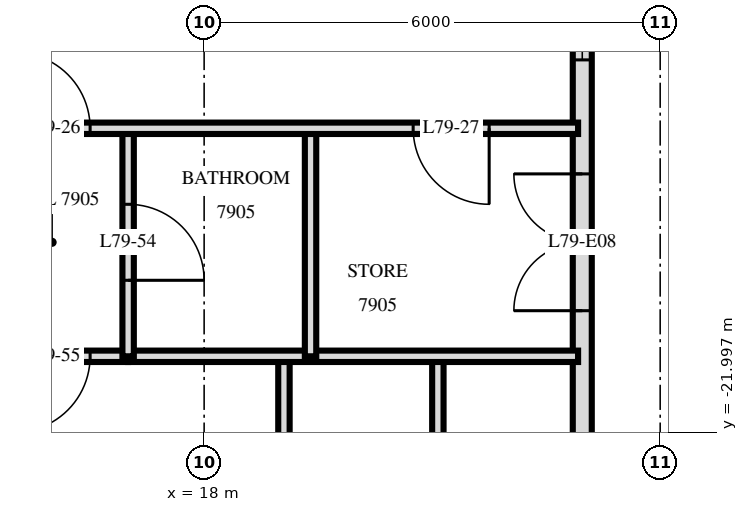
"""IFC4 building model, lengths in metres.
Left out: names, types, materials, properties, quantities, classifications, styles, units other than length and angle.
Written with IfcOpenShell. Run it as: python <this file> out.ifc"""

import sys

from ifc_helpers import new_model, si_unit, direction, frame, frame_2d, origin, place, context, subcontext, project, spatial, rectangle, extrude, element, fill, save


model = new_model("IFC4")
c1 = context("Model", 3, precision=1e-05, world=origin(), true_north=direction((0.0, 1.0)))
c2 = subcontext(c1, "Body", "Model", "MODEL_VIEW")
j1 = project(units=[si_unit("LENGTHUNIT", "METRE"), si_unit("PLANEANGLEUNIT", "RADIAN")], contexts=[c1])
p1 = place(None, origin())
s1 = spatial("IfcSite", under=j1, at=p1, CompositionType="ELEMENT")
p2 = place(p1, origin())
s2 = spatial("IfcBuilding", under=s1, at=p2, CompositionType="ELEMENT")
p3 = place(p2, frame((0.0, 0.0, 298.1)))
s3 = spatial("IfcBuildingStorey", under=s2, at=p3, CompositionType="ELEMENT", Elevation=298.1)
p4 = place(p3, frame((22.975, -29.275, 0.0), z_axis=(0.0, 0.0, 1.0), x_axis=(0.0, 1.0, 0.0)))
e1 = element("IfcWall", 1, at=p4, inside=s3, PredefinedType="SOLIDWALL", context=c2, shape_type="SweptSolid", body=[
    extrude(rectangle(XDim=25.951, YDim=0.25, at=frame_2d((12.975, 0.0))), origin(), (0.0, 0.0, 1.0), 3.22),
])
p5 = place(p4, frame((0.575, 0.0, 0.0)))
e2 = element("IfcOpeningElement", 2, at=p5, cuts=e1, PredefinedType="OPENING", context=c2, shape_type="SweptSolid", body=[
    extrude(rectangle(XDim=1.8, YDim=2.4, at=frame_2d((0.9, 1.2))), frame((0.0, 0.135, 0.0), z_axis=(0.0, -1.0, 0.0), x_axis=(1.0, 0.0, 0.0)), (0.0, 0.0, 1.0), 0.27),
])
p6 = place(p4, frame((3.325, 0.0, 0.9)))
e3 = element("IfcOpeningElement", 3, at=p6, cuts=e1, PredefinedType="OPENING", context=c2, shape_type="SweptSolid", body=[
    extrude(rectangle(XDim=1.8, YDim=1.5, at=frame_2d((0.9, 0.75))), frame((0.0, 0.135, 0.0), z_axis=(0.0, -1.0, 0.0), x_axis=(1.0, 0.0, 0.0)), (0.0, 0.0, 1.0), 0.27),
])
p7 = place(p4, frame((8.875, 0.0, 0.0)))
e4 = element("IfcOpeningElement", 4, at=p7, cuts=e1, PredefinedType="OPENING", context=c2, shape_type="SweptSolid", body=[
    extrude(rectangle(XDim=1.8, YDim=2.4, at=frame_2d((0.9, 1.2))), frame((0.0, 0.135, 0.0), z_axis=(0.0, -1.0, 0.0), x_axis=(1.0, 0.0, 0.0)), (0.0, 0.0, 1.0), 0.27),
])
p8 = place(p4, frame((12.175, 0.0, 0.9)))
e5 = element("IfcOpeningElement", 5, at=p8, cuts=e1, PredefinedType="OPENING", context=c2, shape_type="SweptSolid", body=[
    extrude(rectangle(XDim=1.2, YDim=1.5, at=frame_2d((0.6, 0.75))), frame((0.0, 0.135, 0.0), z_axis=(0.0, -1.0, 0.0), x_axis=(1.0, 0.0, 0.0)), (0.0, 0.0, 1.0), 0.27),
])
p9 = place(p4, frame((16.175, 0.0, 0.0)))
e6 = element("IfcOpeningElement", 6, at=p9, cuts=e1, PredefinedType="OPENING", context=c2, shape_type="SweptSolid", body=[
    extrude(rectangle(XDim=1.8, YDim=2.4, at=frame_2d((0.9, 1.2))), frame((0.0, 0.135, 0.0), z_axis=(0.0, -1.0, 0.0), x_axis=(1.0, 0.0, 0.0)), (0.0, 0.0, 1.0), 0.27),
])
p10 = place(p4, frame((23.425, 0.0, 0.0)))
e7 = element("IfcOpeningElement", 7, at=p10, cuts=e1, PredefinedType="OPENING", context=c2, shape_type="SweptSolid", body=[
    extrude(rectangle(XDim=1.8, YDim=2.4, at=frame_2d((0.9, 1.2))), frame((0.0, 0.135, 0.0), z_axis=(0.0, -1.0, 0.0), x_axis=(1.0, 0.0, 0.0)), (0.0, 0.0, 1.0), 0.27),
])
p11 = place(p3, frame((21.075, -32.666, 0.0), z_axis=(0.0, 0.0, 1.0), x_axis=(0.0, 1.0, 0.0)))
e8 = element("IfcWall", 8, at=p11, inside=s3, PredefinedType="PARTITIONING", context=c2, shape_type="SweptSolid", body=[
    extrude(rectangle(XDim=11.666, YDim=0.15, at=frame_2d((5.833, 0.0))), origin(), (0.0, 0.0, 1.0), 3.22),
])
p12 = place(p11, frame((5.246, 0.0, 0.0)))
e9 = element("IfcOpeningElement", 9, at=p12, cuts=e8, PredefinedType="OPENING", context=c2, shape_type="SweptSolid", body=[
    extrude(rectangle(XDim=0.9, YDim=2.1, at=frame_2d((0.45, 1.05))), frame((0.0, 0.085, 0.0), z_axis=(0.0, -1.0, 0.0), x_axis=(1.0, 0.0, 0.0)), (0.0, 0.0, 1.0), 0.17),
])
p13 = place(p3, frame((19.4, -21.0, 0.0), z_axis=(0.0, 0.0, 1.0), x_axis=(0.0, 1.0, 0.0)))
e10 = element("IfcWall", 10, at=p13, inside=s3, PredefinedType="PARTITIONING", context=c2, shape_type="SweptSolid", body=[
    extrude(rectangle(XDim=3.0, YDim=0.15, at=frame_2d((1.5, 0.0))), origin(), (0.0, 0.0, 1.0), 3.22),
])
p14 = place(p3, frame((19.05, -33.527, 0.0), z_axis=(0.0, 0.0, 1.0), x_axis=(0.0, 1.0, 0.0)))
e11 = element("IfcWall", 11, at=p14, inside=s3, PredefinedType="PARTITIONING", context=c2, shape_type="SweptSolid", body=[
    extrude(rectangle(XDim=12.527, YDim=0.15, at=frame_2d((6.264, 0.0))), origin(), (0.0, 0.0, 1.0), 3.22),
])
p15 = place(p14, frame((5.707, 0.0, 0.0)))
e12 = element("IfcOpeningElement", 12, at=p15, cuts=e11, PredefinedType="OPENING", context=c2, shape_type="SweptSolid", body=[
    extrude(rectangle(XDim=0.9, YDim=2.1, at=frame_2d((0.45, 1.05))), frame((0.0, 0.085, 0.0), z_axis=(0.0, -1.0, 0.0), x_axis=(1.0, 0.0, 0.0)), (0.0, 0.0, 1.0), 0.17),
])
p16 = place(p3, frame((17.0, -21.0, 0.0), z_axis=(0.0, 0.0, 1.0), x_axis=(0.0, 1.0, 0.0)))
e13 = element("IfcWall", 13, at=p16, inside=s3, PredefinedType="PARTITIONING", context=c2, shape_type="SweptSolid", body=[
    extrude(rectangle(XDim=3.0, YDim=0.15, at=frame_2d((1.5, 0.0))), origin(), (0.0, 0.0, 1.0), 3.22),
])
p17 = place(p16, frame((1.0, 0.0, 0.0)))
e14 = element("IfcOpeningElement", 14, at=p17, cuts=e13, PredefinedType="OPENING", context=c2, shape_type="SweptSolid", body=[
    extrude(rectangle(XDim=1.0, YDim=2.1, at=frame_2d((0.5, 1.05))), frame((0.0, 0.085, 0.0), z_axis=(0.0, -1.0, 0.0), x_axis=(1.0, 0.0, 0.0)), (0.0, 0.0, 1.0), 0.17),
])
p18 = place(p3, frame((15.0, -21.0, 0.0), z_axis=(0.0, 0.0, 1.0), x_axis=(1.0, 0.0, 0.0)))
e15 = element("IfcWall", 15, at=p18, inside=s3, PredefinedType="PARTITIONING", context=c2, shape_type="SweptSolid", body=[
    extrude(rectangle(XDim=2.0, YDim=0.15, at=frame_2d((1.0, 0.0))), origin(), (0.0, 0.0, 1.0), 3.22),
])
p19 = place(p18, frame((0.5, 0.0, 0.0)))
e16 = element("IfcOpeningElement", 16, at=p19, cuts=e15, PredefinedType="OPENING", context=c2, shape_type="SweptSolid", body=[
    extrude(rectangle(XDim=1.0, YDim=2.1, at=frame_2d((0.5, 1.05))), frame((0.0, 0.085, 0.0), z_axis=(0.0, -1.0, 0.0), x_axis=(1.0, 0.0, 0.0)), (0.0, 0.0, 1.0), 0.17),
])
p20 = place(p3, frame((17.0, -21.0, 0.0), z_axis=(0.0, 0.0, 1.0), x_axis=(1.0, 0.0, 0.0)))
e17 = element("IfcWall", 17, at=p20, inside=s3, PredefinedType="PARTITIONING", context=c2, shape_type="SweptSolid", body=[
    extrude(rectangle(XDim=5.92, YDim=0.15, at=frame_2d((2.96, 0.0))), origin(), (0.0, 0.0, 1.0), 3.22),
])
p21 = place(p3, frame((-22.92, -18.0, 0.0), z_axis=(0.0, 0.0, 1.0), x_axis=(1.0, 0.0, 0.0)))
e18 = element("IfcWall", 18, at=p21, inside=s3, PredefinedType="PARTITIONING", context=c2, shape_type="SweptSolid", body=[
    extrude(rectangle(XDim=45.84, YDim=0.15, at=frame_2d((22.92, 0.0))), origin(), (0.0, 0.0, 1.0), 3.22),
])
p22 = place(p21, frame((17.07, 0.0, 0.0)))
e19 = element("IfcOpeningElement", 19, at=p22, cuts=e18, PredefinedType="OPENING", context=c2, shape_type="SweptSolid", body=[
    extrude(rectangle(XDim=1.0, YDim=2.1, at=frame_2d((0.5, 1.05))), frame((0.0, 0.085, 0.0), z_axis=(0.0, -1.0, 0.0), x_axis=(1.0, 0.0, 0.0)), (0.0, 0.0, 1.0), 0.17),
])
p23 = place(p21, frame((21.77, 0.0, 0.0)))
e20 = element("IfcOpeningElement", 20, at=p23, cuts=e18, PredefinedType="OPENING", context=c2, shape_type="SweptSolid", body=[
    extrude(rectangle(XDim=1.0, YDim=2.1, at=frame_2d((0.5, 1.05))), frame((0.0, 0.085, 0.0), z_axis=(0.0, -1.0, 0.0), x_axis=(1.0, 0.0, 0.0)), (0.0, 0.0, 1.0), 0.17),
])
p24 = place(p21, frame((28.72, 0.0, 0.0)))
e21 = element("IfcOpeningElement", 21, at=p24, cuts=e18, PredefinedType="OPENING", context=c2, shape_type="SweptSolid", body=[
    extrude(rectangle(XDim=1.0, YDim=2.1, at=frame_2d((0.5, 1.05))), frame((0.0, 0.085, 0.0), z_axis=(0.0, -1.0, 0.0), x_axis=(1.0, 0.0, 0.0)), (0.0, 0.0, 1.0), 0.17),
])
p25 = place(p21, frame((30.52, 0.0, 0.0)))
e22 = element("IfcOpeningElement", 22, at=p25, cuts=e18, PredefinedType="OPENING", context=c2, shape_type="SweptSolid", body=[
    extrude(rectangle(XDim=1.0, YDim=2.1, at=frame_2d((0.5, 1.05))), frame((0.0, 0.085, 0.0), z_axis=(0.0, -1.0, 0.0), x_axis=(1.0, 0.0, 0.0)), (0.0, 0.0, 1.0), 0.17),
])
p26 = place(p21, frame((9.42, 0.0, 0.0)))
e23 = element("IfcOpeningElement", 23, at=p26, cuts=e18, PredefinedType="OPENING", context=c2, shape_type="SweptSolid", body=[
    extrude(rectangle(XDim=1.0, YDim=2.1, at=frame_2d((0.5, 1.05))), frame((0.0, 0.085, 0.0), z_axis=(0.0, -1.0, 0.0), x_axis=(1.0, 0.0, 0.0)), (0.0, 0.0, 1.0), 0.17),
])
p27 = place(p21, frame((2.67, 0.0, 0.0)))
e24 = element("IfcOpeningElement", 24, at=p27, cuts=e18, PredefinedType="OPENING", context=c2, shape_type="SweptSolid", body=[
    extrude(rectangle(XDim=1.0, YDim=2.1, at=frame_2d((0.5, 1.05))), frame((0.0, 0.085, 0.0), z_axis=(0.0, -1.0, 0.0), x_axis=(1.0, 0.0, 0.0)), (0.0, 0.0, 1.0), 0.17),
])
p28 = place(p21, frame((38.42, 0.0, 0.0)))
e25 = element("IfcOpeningElement", 25, at=p28, cuts=e18, PredefinedType="OPENING", context=c2, shape_type="SweptSolid", body=[
    extrude(rectangle(XDim=1.0, YDim=2.1, at=frame_2d((0.5, 1.05))), frame((0.0, 0.085, 0.0), z_axis=(0.0, -1.0, 0.0), x_axis=(1.0, 0.0, 0.0)), (0.0, 0.0, 1.0), 0.17),
])
p29 = place(p21, frame((43.67, 0.0, 0.0)))
e26 = element("IfcOpeningElement", 26, at=p29, cuts=e18, PredefinedType="OPENING", context=c2, shape_type="SweptSolid", body=[
    extrude(rectangle(XDim=1.0, YDim=2.1, at=frame_2d((0.5, 1.05))), frame((0.0, 0.085, 0.0), z_axis=(0.0, -1.0, 0.0), x_axis=(1.0, 0.0, 0.0)), (0.0, 0.0, 1.0), 0.17),
])
p30 = place(p7, origin())
e27 = element("IfcDoor", 27, at=p30, inside=s3, OperationType="DOUBLE_DOOR_SINGLE_SWING", PredefinedType="DOOR", context=c2, shape_type="SweptSolid", body=[
    extrude(rectangle(XDim=1.8, YDim=2.4, at=frame_2d((0.9, 1.2))), frame((0.0, 0.025, 0.0), z_axis=(0.0, -1.0, 0.0), x_axis=(1.0, 0.0, 0.0)), (0.0, 0.0, 1.0), 0.05),
])
fill(e4, e27)
p31 = place(p8, origin())
e28 = element("IfcWindow", 28, at=p31, inside=s3, PartitioningType="SINGLE_PANEL", PredefinedType="WINDOW", context=c2, shape_type="SweptSolid", body=[
    extrude(rectangle(XDim=1.2, YDim=1.5, at=frame_2d((0.6, 0.75))), frame((0.0, 0.03, 0.0), z_axis=(0.0, -1.0, 0.0), x_axis=(1.0, 0.0, 0.0)), (0.0, 0.0, 1.0), 0.06),
])
fill(e5, e28)
p32 = place(p28, origin())
e29 = element("IfcDoor", 29, at=p32, inside=s3, OperationType="SINGLE_SWING_RIGHT", PredefinedType="DOOR", context=c2, shape_type="SweptSolid", body=[
    extrude(rectangle(XDim=1.0, YDim=2.1, at=frame_2d((0.5, 1.05))), frame((0.0, 0.025, 0.0), z_axis=(0.0, -1.0, 0.0), x_axis=(1.0, 0.0, 0.0)), (0.0, 0.0, 1.0), 0.05),
])
fill(e25, e29)
p33 = place(p29, frame((0.5, 0.0, 0.0), z_axis=(0.0, 0.0, 1.0), x_axis=(-1.0, 0.0, 0.0)))
e30 = element("IfcDoor", 30, at=p33, inside=s3, OperationType="SINGLE_SWING_RIGHT", PredefinedType="DOOR", context=c2, shape_type="SweptSolid", body=[
    extrude(rectangle(XDim=1.0, YDim=2.1, at=frame_2d((0.0, 1.05))), frame((0.0, -0.025, 0.0), z_axis=(0.0, 1.0, 0.0), x_axis=(-1.0, 0.0, 0.0)), (0.0, 0.0, 1.0), 0.05),
])
fill(e26, e30)
p34 = place(p17, frame((0.5, 0.0, 0.0), z_axis=(0.0, 0.0, 1.0), x_axis=(-1.0, 0.0, 0.0)))
e31 = element("IfcDoor", 31, at=p34, inside=s3, OperationType="SINGLE_SWING_LEFT", PredefinedType="DOOR", context=c2, shape_type="SweptSolid", body=[
    extrude(rectangle(XDim=1.0, YDim=2.1, at=frame_2d((0.0, 1.05))), frame((0.0, -0.025, 0.0), z_axis=(0.0, 1.0, 0.0), x_axis=(-1.0, 0.0, 0.0)), (0.0, 0.0, 1.0), 0.05),
])
fill(e14, e31)
p35 = place(p19, frame((0.5, 0.0, 0.0), z_axis=(0.0, 0.0, 1.0), x_axis=(-1.0, 0.0, 0.0)))
e32 = element("IfcDoor", 32, at=p35, inside=s3, OperationType="SINGLE_SWING_LEFT", PredefinedType="DOOR", context=c2, shape_type="SweptSolid", body=[
    extrude(rectangle(XDim=1.0, YDim=2.1, at=frame_2d((0.0, 1.05))), frame((0.0, -0.025, 0.0), z_axis=(0.0, 1.0, 0.0), x_axis=(-1.0, 0.0, 0.0)), (0.0, 0.0, 1.0), 0.05),
])
fill(e16, e32)
save(model, sys.argv[1])
